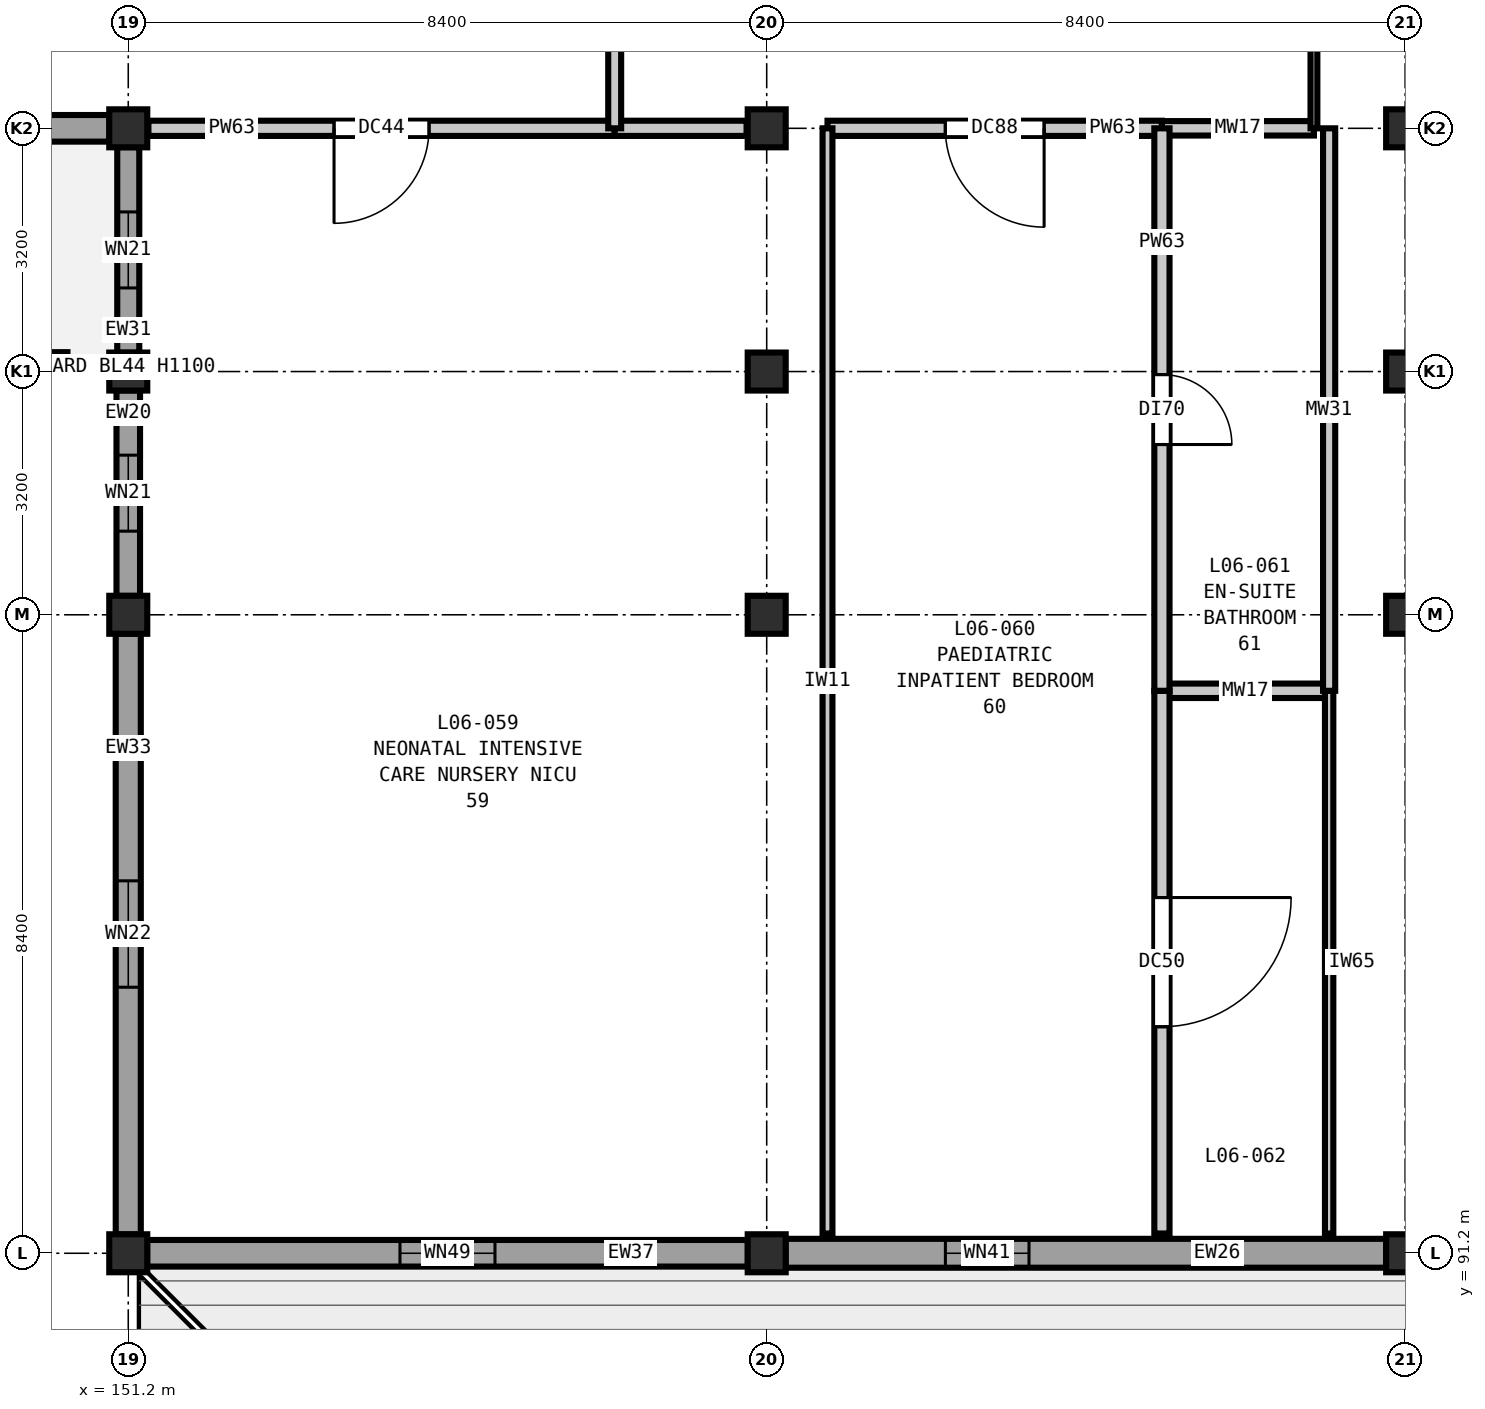
"""IFC4 building model, lengths in metres.
Left out: names, types, materials, properties, quantities, classifications, styles, units other than length and angle.
Written with IfcOpenShell. Run it as: python <this file> out.ifc"""

import sys

from ifc_helpers import new_model, si_unit, direction, frame, frame_2d, origin, origin_2d, place, context, subcontext, project, spatial, rectangle, extrude, element, fill, save


model = new_model("IFC4")
c1 = context("Model", 3, precision=1e-05, world=origin(), true_north=direction((0.0, 1.0)))
c2 = subcontext(c1, "Body", "Model", "MODEL_VIEW")
j1 = project(units=[si_unit("LENGTHUNIT", "METRE"), si_unit("PLANEANGLEUNIT", "RADIAN")], contexts=[c1])
p1 = place(None, origin())
s1 = spatial("IfcSite", under=j1, at=p1, CompositionType="ELEMENT")
p2 = place(p1, origin())
s2 = spatial("IfcBuilding", under=s1, at=p2, CompositionType="ELEMENT")
p3 = place(p2, frame((0.0, 0.0, 28.8)))
s3 = spatial("IfcBuildingStorey", under=s2, at=p3, CompositionType="ELEMENT", Elevation=28.8)
for number, where, z_axis, x_axis in (
    (1, (151.2, 91.2, 0.0), (0.0, 0.0, 1.0), (1.0, 0.0, 0.0)),
    (2, (151.2, 99.6, 0.0), (0.0, 0.0, 1.0), (1.0, 0.0, 0.0)),
    (3, (151.2, 102.8, 0.0), (0.0, 0.0, 1.0), (1.0, 0.0, 0.0)),
    (4, (151.2, 106.0, 0.0), (0.0, 0.0, 1.0), (1.0, 0.0, 0.0)),
    (5, (159.6, 91.2, 0.0), (0.0, 0.0, 1.0), (1.0, 0.0, 0.0)),
    (6, (159.6, 99.6, 0.0), (0.0, 0.0, 1.0), (1.0, 0.0, 0.0)),
    (7, (159.6, 102.8, 0.0), (0.0, 0.0, 1.0), (1.0, 0.0, 0.0)),
    (8, (159.6, 106.0, 0.0), (0.0, 0.0, 1.0), (1.0, 0.0, 0.0)),
    (9, (168.0, 91.2, 0.0), (0.0, 0.0, 1.0), (1.0, 0.0, 0.0)),
    (10, (168.0, 99.6, 0.0), (0.0, 0.0, 1.0), (1.0, 0.0, 0.0)),
    (11, (168.0, 102.8, 0.0), (0.0, 0.0, 1.0), (1.0, 0.0, 0.0)),
    (12, (168.0, 106.0, 0.0), (0.0, 0.0, 1.0), (1.0, 0.0, 0.0)),
):
    element("IfcColumn", number, at=place(p3, frame(where, z_axis=z_axis, x_axis=x_axis)), inside=s3, PredefinedType="COLUMN", context=c2, shape_type="SweptSolid", body=[
        extrude(rectangle(XDim=0.5, YDim=0.5, at=origin_2d()), origin(), (0.0, 0.0, 1.0), 4.2),
    ])
p4 = place(p3, frame((150.952, 106.0, 0.0), z_axis=(0.0, 0.0, 1.0), x_axis=(-1.0, 0.0, 0.0)))
e13 = element("IfcWall", 13, at=p4, inside=s3, PredefinedType="SOLIDWALL", context=c2, shape_type="SweptSolid", body=[
    extrude(rectangle(XDim=7.904, YDim=0.35, at=frame_2d((3.952, 0.0))), origin(), (0.0, 0.0, 1.0), 3.48),
])
p5 = place(p4, frame((4.737, 0.0, 0.9)))
e14 = element("IfcOpeningElement", 14, at=p5, cuts=e13, PredefinedType="OPENING", context=c2, shape_type="SweptSolid", body=[
    extrude(rectangle(XDim=1.05, YDim=1.4, at=frame_2d((0.525, 0.7))), frame((0.0, 0.185, 0.0), z_axis=(0.0, -1.0, 0.0), x_axis=(1.0, 0.0, 0.0)), (0.0, 0.0, 1.0), 0.37),
])
p6 = place(p3, frame((167.752, 91.2, 0.0), z_axis=(0.0, 0.0, 1.0), x_axis=(-1.0, 0.0, 0.0)))
e15 = element("IfcWall", 15, at=p6, inside=s3, PredefinedType="SOLIDWALL", context=c2, shape_type="SweptSolid", body=[
    extrude(rectangle(XDim=7.904, YDim=0.38, at=frame_2d((3.952, 0.0))), origin(), (0.0, 0.0, 1.0), 3.48),
])
p7 = place(p6, frame((4.701, 0.0, 0.9)))
e16 = element("IfcOpeningElement", 16, at=p7, cuts=e15, PredefinedType="OPENING", context=c2, shape_type="SweptSolid", body=[
    extrude(rectangle(XDim=1.1, YDim=1.95, at=frame_2d((0.55, 0.975))), frame((0.0, 0.2, 0.0), z_axis=(0.0, -1.0, 0.0), x_axis=(1.0, 0.0, 0.0)), (0.0, 0.0, 1.0), 0.4),
])
p8 = place(p3, frame((159.352, 91.2, 0.0), z_axis=(0.0, 0.0, 1.0), x_axis=(-1.0, 0.0, 0.0)))
e17 = element("IfcWall", 17, at=p8, inside=s3, PredefinedType="SOLIDWALL", context=c2, shape_type="SweptSolid", body=[
    extrude(rectangle(XDim=7.904, YDim=0.35, at=frame_2d((3.952, 0.0))), origin(), (0.0, 0.0, 1.0), 3.48),
])
p9 = place(p8, frame((3.327, 0.0, 0.9)))
e18 = element("IfcOpeningElement", 18, at=p9, cuts=e17, PredefinedType="OPENING", context=c2, shape_type="SweptSolid", body=[
    extrude(rectangle(XDim=1.25, YDim=1.95, at=frame_2d((0.625, 0.975))), frame((0.0, 0.185, 0.0), z_axis=(0.0, -1.0, 0.0), x_axis=(1.0, 0.0, 0.0)), (0.0, 0.0, 1.0), 0.37),
])
p10 = place(p3, frame((151.2, 91.448, 0.0), z_axis=(0.0, 0.0, 1.0), x_axis=(0.0, 1.0, 0.0)))
e19 = element("IfcWall", 19, at=p10, inside=s3, PredefinedType="SOLIDWALL", context=c2, shape_type="SweptSolid", body=[
    extrude(rectangle(XDim=7.904, YDim=0.33, at=frame_2d((3.952, 0.0))), origin(), (0.0, 0.0, 1.0), 3.48),
])
p11 = place(p10, frame((3.252, 0.0, 0.9)))
e20 = element("IfcOpeningElement", 20, at=p11, cuts=e19, PredefinedType="OPENING", context=c2, shape_type="SweptSolid", body=[
    extrude(rectangle(XDim=1.4, YDim=1.95, at=frame_2d((0.7, 0.975))), frame((0.0, 0.175, 0.0), z_axis=(0.0, -1.0, 0.0), x_axis=(1.0, 0.0, 0.0)), (0.0, 0.0, 1.0), 0.35),
])
p12 = place(p3, frame((151.2, 99.848, 0.0), z_axis=(0.0, 0.0, 1.0), x_axis=(0.0, 1.0, 0.0)))
e21 = element("IfcWall", 21, at=p12, inside=s3, PredefinedType="SOLIDWALL", context=c2, shape_type="SweptSolid", body=[
    extrude(rectangle(XDim=2.704, YDim=0.31, at=frame_2d((1.352, 0.0))), origin(), (0.0, 0.0, 1.0), 3.48),
])
p13 = place(p12, frame((0.852, 0.0, 0.9)))
e22 = element("IfcOpeningElement", 22, at=p13, cuts=e21, PredefinedType="OPENING", context=c2, shape_type="SweptSolid", body=[
    extrude(rectangle(XDim=1.0, YDim=1.55, at=frame_2d((0.5, 0.775))), frame((0.0, 0.165, 0.0), z_axis=(0.0, -1.0, 0.0), x_axis=(1.0, 0.0, 0.0)), (0.0, 0.0, 1.0), 0.33),
])
p14 = place(p3, frame((151.2, 103.048, 0.0), z_axis=(0.0, 0.0, 1.0), x_axis=(0.0, 1.0, 0.0)))
e23 = element("IfcWall", 23, at=p14, inside=s3, PredefinedType="SOLIDWALL", context=c2, shape_type="SweptSolid", body=[
    extrude(rectangle(XDim=2.704, YDim=0.29, at=frame_2d((1.352, 0.0))), origin(), (0.0, 0.0, 1.0), 3.48),
])
p15 = place(p14, frame((0.852, 0.0, 0.9)))
e24 = element("IfcOpeningElement", 24, at=p15, cuts=e23, PredefinedType="OPENING", context=c2, shape_type="SweptSolid", body=[
    extrude(rectangle(XDim=1.0, YDim=1.55, at=frame_2d((0.5, 0.775))), frame((0.0, 0.155, 0.0), z_axis=(0.0, -1.0, 0.0), x_axis=(1.0, 0.0, 0.0)), (0.0, 0.0, 1.0), 0.31),
])
p16 = place(p3, frame((143.4, 102.95, 0.0), z_axis=(0.0, 0.0, 1.0), x_axis=(1.0, 0.0, 0.0)))
e25 = element("IfcWall", 25, at=p16, inside=s3, PredefinedType="PARAPET", context=c2, shape_type="SweptSolid", body=[
    extrude(rectangle(XDim=7.0, YDim=0.21, at=frame_2d((3.5, 0.0))), origin(), (0.0, 0.0, 1.0), 0.95),
])
p17 = place(p3, frame((164.8, 98.6, 0.0), z_axis=(0.0, 0.0, 1.0), x_axis=(1.0, 0.0, 0.0)))
e26 = element("IfcWall", 26, at=p17, inside=s3, PredefinedType="PLUMBINGWALL", context=c2, shape_type="SweptSolid", body=[
    extrude(rectangle(XDim=2.2, YDim=0.19, at=frame_2d((1.1, 0.0))), origin(), (0.0, 0.0, 1.0), 3.92),
])
p18 = place(p3, frame((151.465, 106.0, 0.0), z_axis=(0.0, 0.0, 1.0), x_axis=(1.0, 0.0, 0.0)))
e27 = element("IfcWall", 27, at=p18, inside=s3, PredefinedType="PARTITIONING", context=c2, shape_type="SweptSolid", body=[
    extrude(rectangle(XDim=6.135, YDim=0.2, at=frame_2d((3.067, 0.0))), origin(), (0.0, 0.0, 1.0), 3.635),
])
p19 = place(p18, frame((2.442, 0.0, 0.0)))
e28 = element("IfcOpeningElement", 28, at=p19, cuts=e27, PredefinedType="OPENING", context=c2, shape_type="SweptSolid", body=[
    extrude(rectangle(XDim=1.25, YDim=2.15, at=frame_2d((0.625, 1.075))), frame((0.0, 0.11, 0.0), z_axis=(0.0, -1.0, 0.0), x_axis=(1.0, 0.0, 0.0)), (0.0, 0.0, 1.0), 0.22),
])
p20 = place(p3, frame((157.6, 106.0, 0.0), z_axis=(0.0, 0.0, 1.0), x_axis=(1.0, 0.0, 0.0)))
e29 = element("IfcWall", 29, at=p20, inside=s3, PredefinedType="PARTITIONING", context=c2, shape_type="SweptSolid", body=[
    extrude(rectangle(XDim=1.735, YDim=0.2, at=frame_2d((0.867, 0.0))), origin(), (0.0, 0.0, 1.0), 3.635),
])
p21 = place(p3, frame((160.4, 106.0, 0.0), z_axis=(0.0, 0.0, 1.0), x_axis=(1.0, 0.0, 0.0)))
e30 = element("IfcWall", 30, at=p21, inside=s3, PredefinedType="PARTITIONING", context=c2, shape_type="SweptSolid", body=[
    extrude(rectangle(XDim=4.4, YDim=0.2, at=frame_2d((2.2, 0.0))), origin(), (0.0, 0.0, 1.0), 3.635),
])
p22 = place(p21, frame((1.55, 0.0, 0.0)))
e31 = element("IfcOpeningElement", 31, at=p22, cuts=e30, PredefinedType="OPENING", context=c2, shape_type="SweptSolid", body=[
    extrude(rectangle(XDim=1.3, YDim=2.2, at=frame_2d((0.65, 1.1))), frame((0.0, 0.11, 0.0), z_axis=(0.0, -1.0, 0.0), x_axis=(1.0, 0.0, 0.0)), (0.0, 0.0, 1.0), 0.22),
])
p23 = place(p3, frame((164.8, 106.0, 0.0), z_axis=(0.0, 0.0, 1.0), x_axis=(1.0, 0.0, 0.0)))
e32 = element("IfcWall", 32, at=p23, inside=s3, PredefinedType="PLUMBINGWALL", context=c2, shape_type="SweptSolid", body=[
    extrude(rectangle(XDim=2.0, YDim=0.19, at=frame_2d((1.0, 0.0))), origin(), (0.0, 0.0, 1.0), 3.635),
])
p24 = place(p3, frame((157.6, 106.0, 0.0), z_axis=(0.0, 0.0, 1.0), x_axis=(0.0, 1.0, 0.0)))
e33 = element("IfcWall", 33, at=p24, inside=s3, PredefinedType="PARTITIONING", context=c2, shape_type="SweptSolid", body=[
    extrude(rectangle(XDim=7.2, YDim=0.17, at=frame_2d((3.6, 0.0))), origin(), (0.0, 0.0, 1.0), 3.92),
])
p25 = place(p3, frame((160.4, 91.46, 0.0), z_axis=(0.0, 0.0, 1.0), x_axis=(0.0, 1.0, 0.0)))
e34 = element("IfcWall", 34, at=p25, inside=s3, PredefinedType="PARTITIONING", context=c2, shape_type="SweptSolid", body=[
    extrude(rectangle(XDim=14.54, YDim=0.13, at=frame_2d((7.27, 0.0))), origin(), (0.0, 0.0, 1.0), 3.92),
])
p26 = place(p3, frame((164.8, 91.46, 0.0), z_axis=(0.0, 0.0, 1.0), x_axis=(0.0, 1.0, 0.0)))
e35 = element("IfcWall", 35, at=p26, inside=s3, PredefinedType="PARTITIONING", context=c2, shape_type="SweptSolid", body=[
    extrude(rectangle(XDim=7.14, YDim=0.2, at=frame_2d((3.57, 0.0))), origin(), (0.0, 0.0, 1.0), 3.92),
])
p27 = place(p26, frame((2.72, 0.0, 0.0)))
e36 = element("IfcOpeningElement", 36, at=p27, cuts=e35, PredefinedType="OPENING", context=c2, shape_type="SweptSolid", body=[
    extrude(rectangle(XDim=1.7, YDim=2.3, at=frame_2d((0.85, 1.15))), frame((0.0, 0.11, 0.0), z_axis=(0.0, -1.0, 0.0), x_axis=(1.0, 0.0, 0.0)), (0.0, 0.0, 1.0), 0.22),
])
p28 = place(p3, frame((164.8, 98.6, 0.0), z_axis=(0.0, 0.0, 1.0), x_axis=(0.0, 1.0, 0.0)))
e37 = element("IfcWall", 37, at=p28, inside=s3, PredefinedType="PARTITIONING", context=c2, shape_type="SweptSolid", body=[
    extrude(rectangle(XDim=7.4, YDim=0.2, at=frame_2d((3.7, 0.0))), origin(), (0.0, 0.0, 1.0), 3.92),
])
p29 = place(p28, frame((3.24, 0.0, 0.0)))
e38 = element("IfcOpeningElement", 38, at=p29, cuts=e37, PredefinedType="OPENING", context=c2, shape_type="SweptSolid", body=[
    extrude(rectangle(XDim=0.92, YDim=2.1, at=frame_2d((0.46, 1.05))), frame((0.0, 0.11, 0.0), z_axis=(0.0, -1.0, 0.0), x_axis=(1.0, 0.0, 0.0)), (0.0, 0.0, 1.0), 0.22),
])
p30 = place(p3, frame((166.8, 106.0, 0.0), z_axis=(0.0, 0.0, 1.0), x_axis=(0.0, 1.0, 0.0)))
e39 = element("IfcWall", 39, at=p30, inside=s3, PredefinedType="PARTITIONING", context=c2, shape_type="SweptSolid", body=[
    extrude(rectangle(XDim=7.2, YDim=0.09, at=frame_2d((3.6, 0.0))), origin(), (0.0, 0.0, 1.0), 3.92),
])
p31 = place(p3, frame((167.0, 91.46, 0.0), z_axis=(0.0, 0.0, 1.0), x_axis=(0.0, 1.0, 0.0)))
e40 = element("IfcWall", 40, at=p31, inside=s3, PredefinedType="PARTITIONING", context=c2, shape_type="SweptSolid", body=[
    extrude(rectangle(XDim=7.14, YDim=0.11, at=frame_2d((3.57, 0.0))), origin(), (0.0, 0.0, 1.0), 3.92),
])
p32 = place(p3, frame((167.0, 98.6, 0.0), z_axis=(0.0, 0.0, 1.0), x_axis=(0.0, 1.0, 0.0)))
e41 = element("IfcWall", 41, at=p32, inside=s3, PredefinedType="PLUMBINGWALL", context=c2, shape_type="SweptSolid", body=[
    extrude(rectangle(XDim=7.4, YDim=0.16, at=frame_2d((3.7, 0.0))), origin(), (0.0, 0.0, 1.0), 3.92),
])
p33 = place(p7, origin())
e42 = element("IfcWindow", 42, at=p33, inside=s3, PartitioningType="SINGLE_PANEL", PredefinedType="WINDOW", context=c2, shape_type="SweptSolid", body=[
    extrude(rectangle(XDim=1.1, YDim=1.95, at=frame_2d((0.55, 0.975))), frame((0.0, 0.03, 0.0), z_axis=(0.0, -1.0, 0.0), x_axis=(1.0, 0.0, 0.0)), (0.0, 0.0, 1.0), 0.06),
])
fill(e16, e42)
p34 = place(p9, origin())
e43 = element("IfcWindow", 43, at=p34, inside=s3, PartitioningType="SINGLE_PANEL", PredefinedType="WINDOW", context=c2, shape_type="SweptSolid", body=[
    extrude(rectangle(XDim=1.25, YDim=1.95, at=frame_2d((0.625, 0.975))), frame((0.0, 0.03, 0.0), z_axis=(0.0, -1.0, 0.0), x_axis=(1.0, 0.0, 0.0)), (0.0, 0.0, 1.0), 0.06),
])
fill(e18, e43)
p35 = place(p11, origin())
e44 = element("IfcWindow", 44, at=p35, inside=s3, PartitioningType="SINGLE_PANEL", PredefinedType="WINDOW", context=c2, shape_type="SweptSolid", body=[
    extrude(rectangle(XDim=1.4, YDim=1.95, at=frame_2d((0.7, 0.975))), frame((0.0, 0.03, 0.0), z_axis=(0.0, -1.0, 0.0), x_axis=(1.0, 0.0, 0.0)), (0.0, 0.0, 1.0), 0.06),
])
fill(e20, e44)
p36 = place(p13, origin())
e45 = element("IfcWindow", 45, at=p36, inside=s3, PartitioningType="SINGLE_PANEL", PredefinedType="WINDOW", context=c2, shape_type="SweptSolid", body=[
    extrude(rectangle(XDim=1.0, YDim=1.55, at=frame_2d((0.5, 0.775))), frame((0.0, 0.03, 0.0), z_axis=(0.0, -1.0, 0.0), x_axis=(1.0, 0.0, 0.0)), (0.0, 0.0, 1.0), 0.06),
])
fill(e22, e45)
p37 = place(p15, origin())
e46 = element("IfcWindow", 46, at=p37, inside=s3, PartitioningType="SINGLE_PANEL", PredefinedType="WINDOW", context=c2, shape_type="SweptSolid", body=[
    extrude(rectangle(XDim=1.0, YDim=1.55, at=frame_2d((0.5, 0.775))), frame((0.0, 0.03, 0.0), z_axis=(0.0, -1.0, 0.0), x_axis=(1.0, 0.0, 0.0)), (0.0, 0.0, 1.0), 0.06),
])
fill(e24, e46)
p38 = place(p19, frame((1.25, 0.0, 0.0), z_axis=(0.0, 0.0, 1.0), x_axis=(-1.0, 0.0, 0.0)))
e47 = element("IfcDoor", 47, at=p38, inside=s3, OperationType="SINGLE_SWING_RIGHT", PredefinedType="DOOR", context=c2, shape_type="SweptSolid", body=[
    extrude(rectangle(XDim=1.25, YDim=2.15, at=frame_2d((0.625, 1.075))), frame((0.0, 0.025, 0.0), z_axis=(0.0, -1.0, 0.0), x_axis=(1.0, 0.0, 0.0)), (0.0, 0.0, 1.0), 0.05),
])
fill(e28, e47)
p39 = place(p22, frame((1.3, 0.0, 0.0), z_axis=(0.0, 0.0, 1.0), x_axis=(-1.0, 0.0, 0.0)))
e48 = element("IfcDoor", 48, at=p39, inside=s3, OperationType="SINGLE_SWING_LEFT", PredefinedType="DOOR", context=c2, shape_type="SweptSolid", body=[
    extrude(rectangle(XDim=1.3, YDim=2.2, at=frame_2d((0.65, 1.1))), frame((0.0, 0.025, 0.0), z_axis=(0.0, -1.0, 0.0), x_axis=(1.0, 0.0, 0.0)), (0.0, 0.0, 1.0), 0.05),
])
fill(e31, e48)
p40 = place(p27, frame((1.7, 0.0, 0.0), z_axis=(0.0, 0.0, 1.0), x_axis=(-1.0, 0.0, 0.0)))
e49 = element("IfcDoor", 49, at=p40, inside=s3, OperationType="SINGLE_SWING_LEFT", PredefinedType="DOOR", context=c2, shape_type="SweptSolid", body=[
    extrude(rectangle(XDim=1.7, YDim=2.3, at=frame_2d((0.85, 1.15))), frame((0.0, 0.025, 0.0), z_axis=(0.0, -1.0, 0.0), x_axis=(1.0, 0.0, 0.0)), (0.0, 0.0, 1.0), 0.05),
])
fill(e36, e49)
p41 = place(p29, frame((0.92, 0.0, 0.0), z_axis=(0.0, 0.0, 1.0), x_axis=(-1.0, 0.0, 0.0)))
e50 = element("IfcDoor", 50, at=p41, inside=s3, OperationType="SINGLE_SWING_RIGHT", PredefinedType="DOOR", context=c2, shape_type="SweptSolid", body=[
    extrude(rectangle(XDim=0.92, YDim=2.1, at=frame_2d((0.46, 1.05))), frame((0.0, 0.025, 0.0), z_axis=(0.0, -1.0, 0.0), x_axis=(1.0, 0.0, 0.0)), (0.0, 0.0, 1.0), 0.05),
])
fill(e38, e50)
save(model, sys.argv[1])
